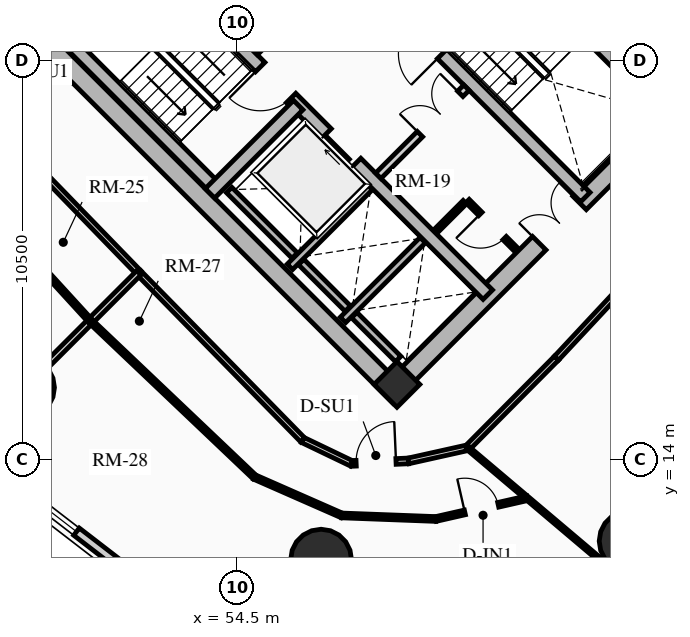
"""IFC4 building model, lengths in metres.
Left out: names, types, materials, properties, quantities, classifications, styles, units other than length and angle.
Written with IfcOpenShell. Run it as: python <this file> out.ifc"""

import sys

from ifc_helpers import new_model, si_unit, direction, frame, frame_2d, origin, origin_2d, place, context, subcontext, project, spatial, rectangle, circle, extrude, source, transform, mapped, element, fill, save


model = new_model("IFC4")
c1 = context("Model", 3, precision=1e-05, world=origin(), true_north=direction((0.0, 1.0)))
c2 = subcontext(c1, "Body", "Model", "MODEL_VIEW")
j1 = project(units=[si_unit("LENGTHUNIT", "METRE"), si_unit("PLANEANGLEUNIT", "RADIAN")], contexts=[c1])
p1 = place(None, origin())
s1 = spatial("IfcSite", under=j1, at=p1, CompositionType="ELEMENT")
p2 = place(p1, origin())
s2 = spatial("IfcBuilding", under=s1, at=p2, CompositionType="ELEMENT")
p3 = place(p2, frame((0.0, 0.0, 24.91)))
s3 = spatial("IfcBuildingStorey", under=s2, at=p3, CompositionType="ELEMENT", Elevation=24.91)
for number, where, z_axis, x_axis in (
    (1, (58.773, 15.661, 0.0), (0.0, 0.0, 1.0), (-0.707, 0.707, 0.0)),
    (2, (66.339, 23.227, 0.0), (0.0, 0.0, 1.0), (-0.707, 0.707, 0.0)),
):
    element("IfcWall", number, at=place(p3, frame(where, z_axis=z_axis, x_axis=x_axis)), inside=s3, PredefinedType="SHEAR", context=c2, shape_type="SweptSolid", body=[
        extrude(rectangle(XDim=14.3, YDim=0.5, at=frame_2d((7.15, 0.0))), origin(), (0.0, 0.0, 1.0), 2.91),
    ])
p4 = place(p3, frame((58.596, 15.838, 0.0), z_axis=(0.0, 0.0, 1.0), x_axis=(0.707106781187, 0.707106781187, 0.0)))
e3 = element("IfcWall", 3, at=p4, inside=s3, PredefinedType="SHEAR", context=c2, shape_type="SweptSolid", body=[
    extrude(rectangle(XDim=10.7, YDim=0.5, at=frame_2d((5.35, 0.0))), origin(), (0.0, 0.0, 1.0), 2.91),
])
m1 = source(origin(), c2, "Body", "SweptSolid", [
    extrude(rectangle(XDim=1.5, YDim=2.02, at=frame_2d((0.75, 1.01))), frame((0.0, 0.26, 0.0), z_axis=(0.0, -1.0, 0.0), x_axis=(1.0, 0.0, 0.0)), (0.0, 0.0, 1.0), 0.52),
])
p5 = place(p4, frame((5.45, 0.0, 0.0)))
e4 = element("IfcOpeningElement", 4, at=p5, cuts=e3, PredefinedType="OPENING", context=c2, shape_type="MappedRepresentation", body=[
    mapped(m1, transform((0.0, 0.0, 0.0), x_axis=(1.0, 0.0, 0.0), y_axis=(0.0, 1.0, 0.0), z_axis=(0.0, 0.0, 1.0), scale=1.0)),
])
p6 = place(p3, frame((61.096, 18.338, 0.0), z_axis=(0.0, 0.0, 1.0), x_axis=(-0.707106781187, 0.707106781187, 0.0)))
e5 = element("IfcWall", 5, at=p6, inside=s3, PredefinedType="SHEAR", context=c2, shape_type="SweptSolid", body=[
    extrude(rectangle(XDim=13.8, YDim=0.35, at=frame_2d((6.9, 0.0))), origin(), (0.0, 0.0, 1.0), 2.91),
])
m2 = source(origin(), c2, "Body", "SweptSolid", [
    extrude(rectangle(XDim=1.1, YDim=2.015, at=frame_2d((0.55, 1.007))), frame((0.0, 0.185, 0.0), z_axis=(0.0, -1.0, 0.0), x_axis=(1.0, 0.0, 0.0)), (0.0, 0.0, 1.0), 0.37),
])
p7 = place(p6, frame((4.9, 0.0, 0.0)))
e6 = element("IfcOpeningElement", 6, at=p7, cuts=e5, PredefinedType="OPENING", context=c2, shape_type="MappedRepresentation", body=[
    mapped(m2, transform((0.0, 0.0, 0.0), x_axis=(1.0, 0.0, 0.0), y_axis=(0.0, 1.0, 0.0), z_axis=(0.0, 0.0, 1.0), scale=1.0)),
])
m3 = source(origin(), c2, "Body", "SweptSolid", [
    extrude(rectangle(XDim=1.15, YDim=2.02, at=frame_2d((0.575, 1.01))), frame((0.0, 0.185, 0.0), z_axis=(0.0, -1.0, 0.0), x_axis=(1.0, 0.0, 0.0)), (0.0, 0.0, 1.0), 0.37),
])
p8 = place(p6, frame((7.32, 0.0, 0.0)))
e7 = element("IfcOpeningElement", 7, at=p8, cuts=e5, PredefinedType="OPENING", context=c2, shape_type="MappedRepresentation", body=[
    mapped(m3, transform((0.0, 0.0, 0.0), x_axis=(1.0, 0.0, 0.0), y_axis=(0.0, 1.0, 0.0), z_axis=(0.0, 0.0, 1.0), scale=1.0)),
])
p9 = place(p3, frame((63.662, 20.904, 0.0), z_axis=(0.0, 0.0, 1.0), x_axis=(-0.707106781187, 0.707106781187, 0.0)))
e8 = element("IfcWall", 8, at=p9, inside=s3, PredefinedType="SHEAR", context=c2, shape_type="SweptSolid", body=[
    extrude(rectangle(XDim=13.8, YDim=0.35, at=frame_2d((6.9, 0.0))), origin(), (0.0, 0.0, 1.0), 2.91),
])
p10 = place(p9, frame((10.025, 0.0, 0.0)))
e9 = element("IfcOpeningElement", 9, at=p10, cuts=e8, PredefinedType="OPENING", context=c2, shape_type="MappedRepresentation", body=[
    mapped(m2, transform((0.0, 0.0, 0.0), x_axis=(1.0, 0.0, 0.0), y_axis=(0.0, 1.0, 0.0), z_axis=(0.0, 0.0, 1.0), scale=1.0)),
])
p11 = place(p9, frame((12.025, 0.0, 0.0)))
e10 = element("IfcOpeningElement", 10, at=p11, cuts=e8, PredefinedType="OPENING", context=c2, shape_type="MappedRepresentation", body=[
    mapped(m2, transform((0.0, 0.0, 0.0), x_axis=(1.0, 0.0, 0.0), y_axis=(0.0, 1.0, 0.0), z_axis=(0.0, 0.0, 1.0), scale=1.0)),
])
p12 = place(p9, frame((5.33, 0.0, 0.0)))
e11 = element("IfcOpeningElement", 11, at=p12, cuts=e8, PredefinedType="OPENING", context=c2, shape_type="MappedRepresentation", body=[
    mapped(m3, transform((0.0, 0.0, 0.0), x_axis=(1.0, 0.0, 0.0), y_axis=(0.0, 1.0, 0.0), z_axis=(0.0, 0.0, 1.0), scale=1.0)),
])
p13 = place(p3, frame((53.922, 21.141, 0.0), z_axis=(0.0, 0.0, 1.0), x_axis=(-0.707106781187, 0.707106781187, 0.0)))
e12 = element("IfcWall", 12, at=p13, inside=s3, PredefinedType="SHEAR", context=c2, shape_type="SweptSolid", body=[
    extrude(rectangle(XDim=6.745, YDim=0.35, at=frame_2d((3.373, 0.0))), origin(), (0.0, 0.0, 1.0), 2.91),
])
p14 = place(p3, frame((53.784, 21.003, 0.0), z_axis=(0.0, 0.0, 1.0), x_axis=(0.707106781187, 0.707106781187, 0.0)))
e13 = element("IfcWall", 13, at=p14, inside=s3, PredefinedType="SHEAR", context=c2, shape_type="SweptSolid", body=[
    extrude(rectangle(XDim=3.285, YDim=0.35, at=frame_2d((1.643, 0.0))), origin(), (0.0, 0.0, 1.0), 2.91),
])
p15 = place(p3, frame((65.847, 23.089, 0.0), z_axis=(0.0, 0.0, 1.0), x_axis=(-0.707106781187, 0.707106781187, 0.0)))
e14 = element("IfcWall", 14, at=p15, inside=s3, PredefinedType="SHEAR", context=c2, shape_type="SweptSolid", body=[
    extrude(rectangle(XDim=6.745, YDim=0.35, at=frame_2d((3.373, 0.0))), origin(), (0.0, 0.0, 1.0), 2.91),
])
p16 = place(p3, frame((58.706, 15.976, 0.0), z_axis=(0.0, 0.0, 1.0), x_axis=(0.707106781187, 0.707106781187, 0.0)))
e15 = element("IfcColumn", 15, at=p16, inside=s3, PredefinedType="COLUMN", context=c2, shape_type="SweptSolid", body=[
    extrude(rectangle(XDim=0.85, YDim=0.85, at=origin_2d()), origin(), (0.0, 0.0, 1.0), 2.91),
])
for number, where, z_axis, x_axis in (
    (16, (48.893, 15.893, 0.0), (0.0, 0.0, 1.0), (1.0, 0.0, 0.0)),
    (17, (56.709, 11.365, 0.0), (0.0, 0.0, 1.0), (1.0, 0.0, 0.0)),
    (18, (64.827, 11.854, 0.0), (0.0, 0.0, 1.0), (1.0, 0.0, 0.0)),
):
    element("IfcColumn", number, at=place(p3, frame(where, z_axis=z_axis, x_axis=x_axis)), inside=s3, PredefinedType="USERDEFINED", context=c2, shape_type="SweptSolid", body=[
        extrude(circle(Radius=0.8, at=origin_2d()), origin(), (0.0, 0.0, 1.0), 2.91),
    ])
p17 = place(p3, frame((51.688, 11.01, 0.0), z_axis=(0.0, 0.0, 1.0), x_axis=(-0.791972010801, 0.610557396243, 0.0)))
e19 = element("IfcWall", 19, at=p17, inside=s3, PredefinedType="SOLIDWALL", context=c2, shape_type="SweptSolid", body=[
    extrude(rectangle(XDim=5.475, YDim=0.24, at=frame_2d((2.737, 0.0))), origin(), (0.0, 0.0, 1.0), 2.073),
])
m4 = source(origin(), c2, "Body", "SweptSolid", [
    extrude(rectangle(XDim=1.9, YDim=1.35, at=frame_2d((0.95, 0.675))), frame((0.0, 0.13, 0.0), z_axis=(0.0, -1.0, 0.0), x_axis=(1.0, 0.0, 0.0)), (0.0, 0.0, 1.0), 0.26),
])
p18 = place(p17, frame((1.787, 0.0, 0.65)))
e20 = element("IfcOpeningElement", 20, at=p18, cuts=e19, PredefinedType="OPENING", context=c2, shape_type="MappedRepresentation", body=[
    mapped(m4, transform((0.0, 0.0, 0.0), x_axis=(1.0, 0.0, 0.0), y_axis=(0.0, 1.0, 0.0), z_axis=(0.0, 0.0, 1.0), scale=1.0)),
])
p19 = place(p3, frame((55.888, 19.069, 0.0), z_axis=(0.0, 0.0, 1.0), x_axis=(0.707106781187, 0.707106781187, 0.0)))
e21 = element("IfcWall", 21, at=p19, inside=s3, PredefinedType="SHEAR", context=c2, shape_type="SweptSolid", body=[
    extrude(rectangle(XDim=2.97, YDim=0.2, at=frame_2d((1.485, 0.0))), origin(), (0.0, 0.0, 1.0), 2.91),
])
p20 = place(p3, frame((56.015, 19.366, 0.0), z_axis=(0.0, 0.0, 1.0), x_axis=(-0.707106781187, 0.707106781187, 0.0)))
e22 = element("IfcWall", 22, at=p20, inside=s3, PredefinedType="SHEAR", context=c2, shape_type="SweptSolid", body=[
    extrude(rectangle(XDim=2.44, YDim=0.2, at=frame_2d((1.22, 0.0))), origin(), (0.0, 0.0, 1.0), 2.91),
])
p21 = place(p3, frame((57.284, 17.673, 0.0), z_axis=(0.0, 0.0, 1.0), x_axis=(0.707147878904, 0.70706568108, 0.0)))
e23 = element("IfcWall", 23, at=p21, inside=s3, PredefinedType="SHEAR", context=c2, shape_type="SweptSolid", body=[
    extrude(rectangle(XDim=2.97, YDim=0.2, at=frame_2d((1.485, 0.0))), origin(), (0.0, 0.0, 1.0), 2.91),
])
p22 = place(p3, frame((57.412, 17.97, 0.0), z_axis=(0.0, 0.0, 1.0), x_axis=(-0.707106781187, 0.707106781187, 0.0)))
e24 = element("IfcWall", 24, at=p22, inside=s3, PredefinedType="SHEAR", context=c2, shape_type="SweptSolid", body=[
    extrude(rectangle(XDim=1.735, YDim=0.2, at=frame_2d((0.867, 0.0))), origin(), (0.0, 0.0, 1.0), 2.91),
])
p23 = place(p3, frame((58.737, 16.644, 0.0), z_axis=(0.0, 0.0, 1.0), x_axis=(-0.707032117043, 0.707181437447, 0.0)))
e25 = element("IfcWall", 25, at=p23, inside=s3, PredefinedType="SHEAR", context=c2, shape_type="SweptSolid", body=[
    extrude(rectangle(XDim=1.635, YDim=0.2, at=frame_2d((0.817, 0.0))), origin(), (0.0, 0.0, 1.0), 2.91),
])
p24 = place(p3, frame((58.214, 21.467, 0.0), z_axis=(0.0, 0.0, 1.0), x_axis=(0.707106781187, 0.707106781187, 0.0)))
e26 = element("IfcWall", 26, at=p24, inside=s3, PredefinedType="PARTITIONING", context=c2, shape_type="SweptSolid", body=[
    extrude(rectangle(XDim=3.28, YDim=0.2, at=frame_2d((1.64, 0.0))), origin(), (0.0, 0.0, 1.0), 2.635),
])
m5 = source(origin(), c2, "Body", "SweptSolid", [
    extrude(rectangle(XDim=1.5, YDim=2.02, at=frame_2d((0.75, 1.01))), frame((0.0, 0.11, 0.0), z_axis=(0.0, -1.0, 0.0), x_axis=(1.0, 0.0, 0.0)), (0.0, 0.0, 1.0), 0.22),
])
p25 = place(p24, frame((1.55, 0.0, 0.0)))
e27 = element("IfcOpeningElement", 27, at=p25, cuts=e26, PredefinedType="OPENING", context=c2, shape_type="MappedRepresentation", body=[
    mapped(m5, transform((0.0, 0.0, 0.0), x_axis=(1.0, 0.0, 0.0), y_axis=(0.0, 1.0, 0.0), z_axis=(0.0, 0.0, 1.0), scale=1.0)),
])
p26 = place(p3, frame((54.961, 24.719, 0.0), z_axis=(0.0, 0.0, 1.0), x_axis=(0.707106781187, 0.707106781187, 0.0)))
e28 = element("IfcWall", 28, at=p26, inside=s3, PredefinedType="PARTITIONING", context=c2, shape_type="SweptSolid", body=[
    extrude(rectangle(XDim=3.28, YDim=0.2, at=frame_2d((1.64, 0.0))), origin(), (0.0, 0.0, 1.0), 2.635),
])
m6 = source(origin(), c2, "Body", "SweptSolid", [
    extrude(rectangle(XDim=0.9, YDim=2.005, at=frame_2d((0.45, 1.002))), frame((0.0, 0.11, 0.0), z_axis=(0.0, -1.0, 0.0), x_axis=(1.0, 0.0, 0.0)), (0.0, 0.0, 1.0), 0.22),
])
p27 = place(p26, frame((0.16, 0.0, 0.0)))
e29 = element("IfcOpeningElement", 29, at=p27, cuts=e28, PredefinedType="OPENING", context=c2, shape_type="MappedRepresentation", body=[
    mapped(m6, transform((0.0, 0.0, 0.0), x_axis=(1.0, 0.0, 0.0), y_axis=(0.0, 1.0, 0.0), z_axis=(0.0, 0.0, 1.0), scale=1.0)),
])
p28 = place(p3, frame((61.835, 19.529, 0.0), z_axis=(0.0, 0.0, 1.0), x_axis=(-0.707174592913, 0.707038962956, 0.0)))
e30 = element("IfcWall", 30, at=p28, inside=s3, PredefinedType="PARTITIONING", context=c2, shape_type="SweptSolid", body=[
    extrude(rectangle(XDim=1.8, YDim=0.125, at=frame_2d((0.9, 0.0))), origin(), (0.0, 0.0, 1.0), 2.635),
])
m7 = source(origin(), c2, "Body", "SweptSolid", [
    extrude(rectangle(XDim=0.9, YDim=2.005, at=frame_2d((0.45, 1.002))), frame((0.0, 0.073, 0.0), z_axis=(0.0, -1.0, 0.0), x_axis=(1.0, 0.0, 0.0)), (0.0, 0.0, 1.0), 0.145),
])
p29 = place(p28, frame((0.42, 0.0, 0.0)))
e31 = element("IfcOpeningElement", 31, at=p29, cuts=e30, PredefinedType="OPENING", context=c2, shape_type="MappedRepresentation", body=[
    mapped(m7, transform((0.0, 0.0, 0.0), x_axis=(1.0, 0.0, 0.0), y_axis=(0.0, 1.0, 0.0), z_axis=(0.0, 0.0, 1.0), scale=1.0)),
])
p30 = place(p3, frame((59.713, 19.996, 0.0), z_axis=(0.0, 0.0, 1.0), x_axis=(0.707217726, 0.706995818963, 0.0)))
e32 = element("IfcWall", 32, at=p30, inside=s3, PredefinedType="PARTITIONING", context=c2, shape_type="SweptSolid", body=[
    extrude(rectangle(XDim=1.1, YDim=0.125, at=frame_2d((0.55, 0.0))), origin(), (0.0, 0.0, 1.0), 2.635),
])
p31 = place(p3, frame((47.706, 23.253, 0.0), z_axis=(0.0, 0.0, 1.0), x_axis=(0.696179266346, -0.717867974707, 0.0)))
e33 = element("IfcWall", 33, at=p31, inside=s3, PredefinedType="PARTITIONING", context=c2, shape_type="SweptSolid", body=[
    extrude(rectangle(XDim=6.045, YDim=0.15, at=frame_2d((3.022, 0.0))), origin(), (0.0, 0.0, 1.0), 2.635),
])
p32 = place(p3, frame((51.914, 18.914, 0.0), z_axis=(0.0, 0.0, 1.0), x_axis=(0.699999313799, -0.714143515465, 0.0)))
e34 = element("IfcWall", 34, at=p32, inside=s3, PredefinedType="PARTITIONING", context=c2, shape_type="SweptSolid", body=[
    extrude(rectangle(XDim=6.162, YDim=0.15, at=frame_2d((3.081, 0.0))), origin(), (0.0, 0.0, 1.0), 2.159),
])
p33 = place(p3, frame((56.227, 14.513, 0.0), z_axis=(0.0, 0.0, 1.0), x_axis=(0.901477579283, -0.432825801044, 0.0)))
e35 = element("IfcWall", 35, at=p33, inside=s3, PredefinedType="PARTITIONING", context=c2, shape_type="SweptSolid", body=[
    extrude(rectangle(XDim=1.424, YDim=0.15, at=frame_2d((0.712, 0.0))), origin(), (0.0, 0.0, 1.0), 2.205),
])
p34 = place(p3, frame((57.511, 13.897, 0.0), z_axis=(0.0, 0.0, 1.0), x_axis=(0.999024538494, 0.044158481476, 0.0)))
e36 = element("IfcWall", 36, at=p34, inside=s3, PredefinedType="PARTITIONING", context=c2, shape_type="SweptSolid", body=[
    extrude(rectangle(XDim=1.498, YDim=0.15, at=frame_2d((0.749, 0.0))), origin(), (0.0, 0.0, 1.0), 2.159),
])
m8 = source(origin(), c2, "Body", "SweptSolid", [
    extrude(rectangle(XDim=1.05, YDim=2.015, at=frame_2d((0.525, 1.007))), frame((0.0, 0.085, 0.0), z_axis=(0.0, -1.0, 0.0), x_axis=(1.0, 0.0, 0.0)), (0.0, 0.0, 1.0), 0.17),
])
p35 = place(p34, frame((0.12, 0.0, 0.0)))
e37 = element("IfcOpeningElement", 37, at=p35, cuts=e36, PredefinedType="OPENING", context=c2, shape_type="MappedRepresentation", body=[
    mapped(m8, transform((0.0, 0.0, 0.0), x_axis=(1.0, 0.0, 0.0), y_axis=(0.0, 1.0, 0.0), z_axis=(0.0, 0.0, 1.0), scale=1.0)),
])
p36 = place(p3, frame((59.008, 13.963, 0.0), z_axis=(0.0, 0.0, 1.0), x_axis=(0.976020856791, 0.21767702476, 0.0)))
e38 = element("IfcWall", 38, at=p36, inside=s3, PredefinedType="PARTITIONING", context=c2, shape_type="SweptSolid", body=[
    extrude(rectangle(XDim=1.593, YDim=0.15, at=frame_2d((0.796, 0.0))), origin(), (0.0, 0.0, 1.0), 2.205),
])
p37 = place(p3, frame((60.562, 14.31, 0.0), z_axis=(0.0, 0.0, 1.0), x_axis=(0.704566236161, 0.709638230975, 0.0)))
e39 = element("IfcWall", 39, at=p37, inside=s3, PredefinedType="PARTITIONING", context=c2, shape_type="SweptSolid", body=[
    extrude(rectangle(XDim=3.321, YDim=0.15, at=frame_2d((1.661, 0.0))), origin(), (0.0, 0.0, 1.0), 2.159),
])
p38 = place(p3, frame((62.903, 16.667, 0.0), z_axis=(0.0, 0.0, 1.0), x_axis=(0.682371947497, 0.731005147225, 0.0)))
e40 = element("IfcWall", 40, at=p38, inside=s3, PredefinedType="PARTITIONING", context=c2, shape_type="SweptSolid", body=[
    extrude(rectangle(XDim=6.642, YDim=0.15, at=frame_2d((3.321, 0.0))), origin(), (0.0, 0.0, 1.0), 2.159),
])
p39 = place(p3, frame((51.914, 18.914, 0.0), z_axis=(0.0, 0.0, 1.0), x_axis=(-0.707106781187, -0.707106781187, 0.0)))
e41 = element("IfcWall", 41, at=p39, inside=s3, PredefinedType="PARTITIONING", context=c2, shape_type="SweptSolid", body=[
    extrude(rectangle(XDim=6.431, YDim=0.16, at=frame_2d((3.215, 0.0))), origin(), (0.0, 0.0, 1.0), 2.073),
])
p40 = place(p3, frame((60.562, 14.31, 0.0), z_axis=(0.0, 0.0, 1.0), x_axis=(0.763547638675, -0.645751502881, 0.0)))
e42 = element("IfcWall", 42, at=p40, inside=s3, PredefinedType="MOVABLE", context=c2, shape_type="SweptSolid", body=[
    extrude(rectangle(XDim=7.345, YDim=0.1, at=frame_2d((3.673, 0.0))), origin(), (0.0, 0.0, 1.0), 2.073),
])
p41 = place(p3, frame((46.676, 21.978, 0.0), z_axis=(0.0, 0.0, 1.0), x_axis=(0.67473816271, -0.738057187339, 0.0)))
e43 = element("IfcWall", 43, at=p41, inside=s3, PredefinedType="PARTITIONING", context=c2, shape_type="SweptSolid", body=[
    extrude(rectangle(XDim=5.876, YDim=0.125, at=frame_2d((2.938, 0.0))), origin(), (0.0, 0.0, 1.0), 2.635),
])
p42 = place(p3, frame((50.641, 17.641, 0.0), z_axis=(0.0, 0.0, 1.0), x_axis=(0.724909383019, -0.688844239586, 0.0)))
e44 = element("IfcWall", 44, at=p42, inside=s3, PredefinedType="PARTITIONING", context=c2, shape_type="SweptSolid", body=[
    extrude(rectangle(XDim=5.957, YDim=0.125, at=frame_2d((2.979, 0.0))), origin(), (0.0, 0.0, 1.0), 2.159),
])
p43 = place(p3, frame((54.959, 13.537, 0.0), z_axis=(0.0, 0.0, 1.0), x_axis=(0.915414044123, -0.402513512596, 0.0)))
e45 = element("IfcWall", 45, at=p43, inside=s3, PredefinedType="PARTITIONING", context=c2, shape_type="SweptSolid", body=[
    extrude(rectangle(XDim=2.508, YDim=0.125, at=frame_2d((1.254, 0.0))), origin(), (0.0, 0.0, 1.0), 2.159),
])
p44 = place(p3, frame((57.255, 12.528, 0.0), z_axis=(0.0, 0.0, 1.0), x_axis=(0.999290303909, -0.037668136579, 0.0)))
e46 = element("IfcWall", 46, at=p44, inside=s3, PredefinedType="PARTITIONING", context=c2, shape_type="SweptSolid", body=[
    extrude(rectangle(XDim=2.476, YDim=0.125, at=frame_2d((1.238, 0.0))), origin(), (0.0, 0.0, 1.0), 2.159),
])
p45 = place(p3, frame((59.729, 12.434, 0.0), z_axis=(0.0, 0.0, 1.0), x_axis=(0.975062765266, 0.221929276555, 0.0)))
e47 = element("IfcWall", 47, at=p45, inside=s3, PredefinedType="PARTITIONING", context=c2, shape_type="SweptSolid", body=[
    extrude(rectangle(XDim=2.465, YDim=0.125, at=frame_2d((1.233, 0.0))), origin(), (0.0, 0.0, 1.0), 2.205),
])
p46 = place(p45, frame((0.783, 0.0, 0.0)))
e48 = element("IfcOpeningElement", 48, at=p46, cuts=e47, PredefinedType="OPENING", context=c2, shape_type="MappedRepresentation", body=[
    mapped(m7, transform((0.0, 0.0, 0.0), x_axis=(1.0, 0.0, 0.0), y_axis=(0.0, 1.0, 0.0), z_axis=(0.0, 0.0, 1.0), scale=1.0)),
])
m9 = source(origin(), c2, "Body", "SweptSolid", [
    extrude(rectangle(XDim=1.9, YDim=1.35, at=frame_2d((0.95, 0.675))), frame((0.0, 0.03, 0.0), z_axis=(0.0, -1.0, 0.0), x_axis=(1.0, 0.0, 0.0)), (0.0, 0.0, 1.0), 0.06),
])
p47 = place(p18, origin())
e49 = element("IfcWindow", 49, at=p47, inside=s3, PartitioningType="DOUBLE_PANEL_VERTICAL", PredefinedType="WINDOW", context=c2, shape_type="MappedRepresentation", body=[
    mapped(m9, transform((0.0, 0.0, 0.0), x_axis=(1.0, 0.0, 0.0), y_axis=(0.0, 1.0, 0.0), z_axis=(0.0, 0.0, 1.0), scale=1.0)),
])
fill(e20, e49)
m10 = source(origin(), c2, "Body", "SweptSolid", [
    extrude(rectangle(XDim=1.1, YDim=2.015, at=frame_2d((0.55, 1.007))), frame((0.0, 0.025, 0.0), z_axis=(0.0, -1.0, 0.0), x_axis=(1.0, 0.0, 0.0)), (0.0, 0.0, 1.0), 0.05),
])
p48 = place(p7, origin())
e50 = element("IfcDoor", 50, at=p48, inside=s3, OperationType="SLIDING_TO_RIGHT", PredefinedType="DOOR", context=c2, shape_type="MappedRepresentation", body=[
    mapped(m10, transform((0.0, 0.0, 0.0), x_axis=(1.0, 0.0, 0.0), y_axis=(0.0, 1.0, 0.0), z_axis=(0.0, 0.0, 1.0), scale=1.0)),
])
fill(e6, e50)
m11 = source(origin(), c2, "Body", "SweptSolid", [
    extrude(rectangle(XDim=1.15, YDim=2.02, at=frame_2d((0.575, 1.01))), frame((0.0, 0.025, 0.0), z_axis=(0.0, -1.0, 0.0), x_axis=(1.0, 0.0, 0.0)), (0.0, 0.0, 1.0), 0.05),
])
p49 = place(p8, origin())
e51 = element("IfcDoor", 51, at=p49, inside=s3, OperationType="SINGLE_SWING_RIGHT", PredefinedType="DOOR", context=c2, shape_type="MappedRepresentation", body=[
    mapped(m11, transform((0.0, 0.0, 0.0), x_axis=(1.0, 0.0, 0.0), y_axis=(0.0, 1.0, 0.0), z_axis=(0.0, 0.0, 1.0), scale=1.0)),
])
fill(e7, e51)
p50 = place(p12, origin())
e52 = element("IfcDoor", 52, at=p50, inside=s3, OperationType="SINGLE_SWING_LEFT", PredefinedType="DOOR", context=c2, shape_type="MappedRepresentation", body=[
    mapped(m11, transform((0.0, 0.0, 0.0), x_axis=(1.0, 0.0, 0.0), y_axis=(0.0, 1.0, 0.0), z_axis=(0.0, 0.0, 1.0), scale=1.0)),
])
fill(e11, e52)
m12 = source(origin(), c2, "Body", "SweptSolid", [
    extrude(rectangle(XDim=1.5, YDim=2.02, at=frame_2d((0.75, 1.01))), frame((0.0, 0.025, 0.0), z_axis=(0.0, -1.0, 0.0), x_axis=(1.0, 0.0, 0.0)), (0.0, 0.0, 1.0), 0.05),
])
p51 = place(p5, origin())
e53 = element("IfcDoor", 53, at=p51, inside=s3, OperationType="DOUBLE_DOOR_SINGLE_SWING", PredefinedType="DOOR", context=c2, shape_type="MappedRepresentation", body=[
    mapped(m12, transform((0.0, 0.0, 0.0), x_axis=(1.0, 0.0, 0.0), y_axis=(0.0, 1.0, 0.0), z_axis=(0.0, 0.0, 1.0), scale=1.0)),
])
fill(e4, e53)
p52 = place(p25, origin())
e54 = element("IfcDoor", 54, at=p52, inside=s3, OperationType="DOUBLE_DOOR_SINGLE_SWING", PredefinedType="DOOR", context=c2, shape_type="MappedRepresentation", body=[
    mapped(m12, transform((0.0, 0.0, 0.0), x_axis=(1.0, 0.0, 0.0), y_axis=(0.0, 1.0, 0.0), z_axis=(0.0, 0.0, 1.0), scale=1.0)),
])
fill(e27, e54)
m13 = source(origin(), c2, "Body", "SweptSolid", [
    extrude(rectangle(XDim=0.9, YDim=2.005, at=frame_2d((0.45, 1.002))), frame((0.0, 0.025, 0.0), z_axis=(0.0, -1.0, 0.0), x_axis=(1.0, 0.0, 0.0)), (0.0, 0.0, 1.0), 0.05),
])
p53 = place(p29, origin())
e55 = element("IfcDoor", 55, at=p53, inside=s3, OperationType="SINGLE_SWING_RIGHT", PredefinedType="DOOR", context=c2, shape_type="MappedRepresentation", body=[
    mapped(m13, transform((0.0, 0.0, 0.0), x_axis=(1.0, 0.0, 0.0), y_axis=(0.0, 1.0, 0.0), z_axis=(0.0, 0.0, 1.0), scale=1.0)),
])
fill(e31, e55)
m14 = source(origin(), c2, "Body", "SweptSolid", [
    extrude(rectangle(XDim=1.05, YDim=2.015, at=frame_2d((0.525, 1.007))), frame((0.0, 0.025, 0.0), z_axis=(0.0, -1.0, 0.0), x_axis=(1.0, 0.0, 0.0)), (0.0, 0.0, 1.0), 0.05),
])
p54 = place(p35, origin())
e56 = element("IfcDoor", 56, at=p54, inside=s3, OperationType="SINGLE_SWING_RIGHT", PredefinedType="DOOR", context=c2, shape_type="MappedRepresentation", body=[
    mapped(m14, transform((0.0, 0.0, 0.0), x_axis=(1.0, 0.0, 0.0), y_axis=(0.0, 1.0, 0.0), z_axis=(0.0, 0.0, 1.0), scale=1.0)),
])
fill(e37, e56)
p55 = place(p46, origin())
e57 = element("IfcDoor", 57, at=p55, inside=s3, OperationType="SINGLE_SWING_LEFT", PredefinedType="DOOR", context=c2, shape_type="MappedRepresentation", body=[
    mapped(m13, transform((0.0, 0.0, 0.0), x_axis=(1.0, 0.0, 0.0), y_axis=(0.0, 1.0, 0.0), z_axis=(0.0, 0.0, 1.0), scale=1.0)),
])
fill(e48, e57)
save(model, sys.argv[1])
